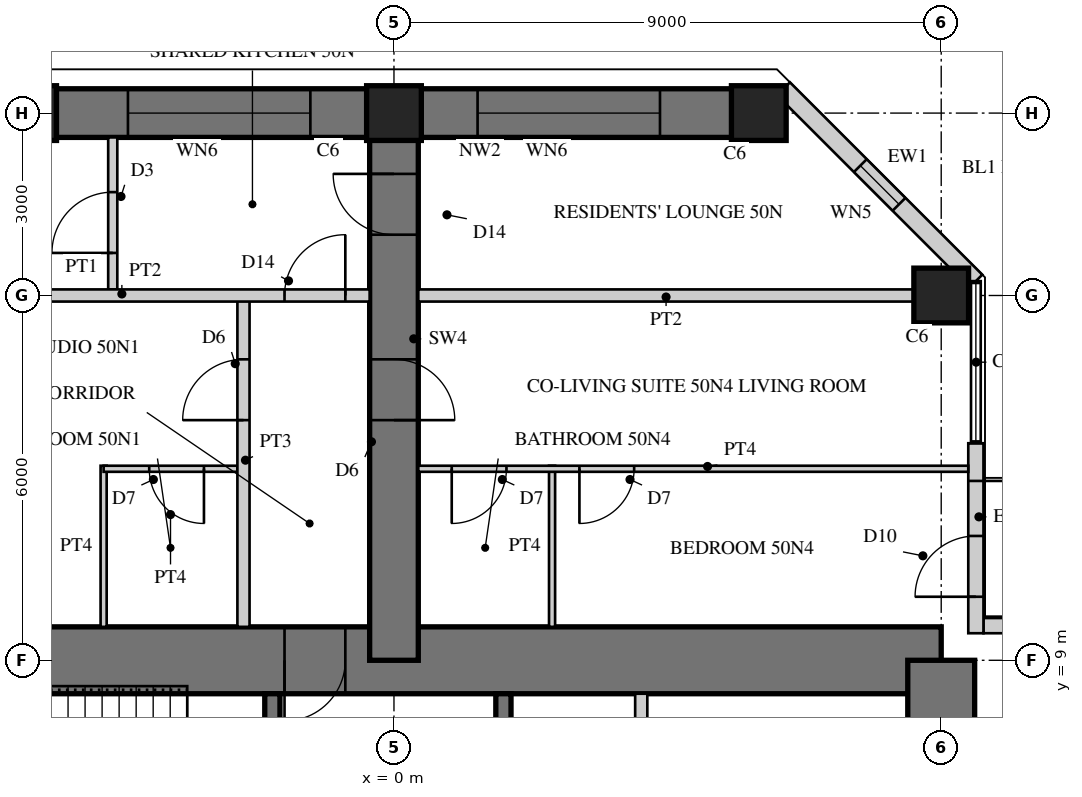
"""IFC4 building model, lengths in metres.
Left out: names, types, materials, properties, quantities, classifications, styles, units other than length and angle.
Written with IfcOpenShell. Run it as: python <this file> out.ifc"""

import sys

from ifc_helpers import new_model, si_unit, direction, frame, frame_2d, origin, origin_2d, place, context, subcontext, project, spatial, rectangle, hollow_rectangle, extrude, element, fill, save


model = new_model("IFC4")
c1 = context("Model", 3, precision=1e-05, world=origin(), true_north=direction((0.0, 1.0)))
c2 = subcontext(c1, "Body", "Model", "MODEL_VIEW")
j1 = project(units=[si_unit("LENGTHUNIT", "METRE"), si_unit("PLANEANGLEUNIT", "RADIAN")], contexts=[c1])
p1 = place(None, origin())
s1 = spatial("IfcSite", under=j1, at=p1, CompositionType="ELEMENT")
p2 = place(p1, origin())
s2 = spatial("IfcBuilding", under=s1, at=p2, CompositionType="ELEMENT")
p3 = place(p2, frame((0.0, 0.0, 200.1)))
s3 = spatial("IfcBuildingStorey", under=s2, at=p3, CompositionType="ELEMENT", Elevation=200.1)
p4 = place(p3, frame((9.0, 9.0, 0.0), z_axis=(0.0, 0.0, 1.0), x_axis=(-1.0, 0.0, 0.0)))
e1 = element("IfcWall", 1, at=p4, inside=s3, PredefinedType="SHEAR", context=c2, shape_type="SweptSolid", body=[
    extrude(rectangle(XDim=18.0, YDim=1.1, at=frame_2d((9.0, 0.0))), origin(), (0.0, 0.0, 1.0), 3.4),
])
p5 = place(p4, frame((9.8, 0.0, 0.0)))
e2 = element("IfcOpeningElement", 2, at=p5, cuts=e1, PredefinedType="OPENING", context=c2, shape_type="SweptSolid", body=[
    extrude(rectangle(XDim=1.0, YDim=2.4, at=frame_2d((0.5, 1.2))), frame((0.0, 0.56, 0.0), z_axis=(0.0, -1.0, 0.0), x_axis=(1.0, 0.0, 0.0)), (0.0, 0.0, 1.0), 1.12),
])
p6 = place(p3, frame((9.0, -9.0, 0.0), z_axis=(0.0, 0.0, 1.0), x_axis=(0.0, 1.0, 0.0)))
e3 = element("IfcWall", 3, at=p6, inside=s3, PredefinedType="SHEAR", context=c2, shape_type="SweptSolid", body=[
    extrude(rectangle(XDim=18.0, YDim=1.1, at=frame_2d((9.0, 0.0))), origin(), (0.0, 0.0, 1.0), 3.4),
])
p7 = place(p6, frame((9.8, 0.0, 0.0)))
e4 = element("IfcOpeningElement", 4, at=p7, cuts=e3, PredefinedType="OPENING", context=c2, shape_type="SweptSolid", body=[
    extrude(rectangle(XDim=1.0, YDim=2.4, at=frame_2d((0.5, 1.2))), frame((0.0, 0.56, 0.0), z_axis=(0.0, -1.0, 0.0), x_axis=(1.0, 0.0, 0.0)), (0.0, 0.0, 1.0), 1.12),
])
p8 = place(p3, frame((1.8, 1.875, 0.0), z_axis=(0.0, 0.0, 1.0), x_axis=(0.0, 1.0, 0.0)))
e5 = element("IfcWall", 5, at=p8, inside=s3, PredefinedType="SHEAR", context=c2, shape_type="SweptSolid", body=[
    extrude(rectangle(XDim=6.575, YDim=0.25, at=frame_2d((3.288, 0.0))), origin(), (0.0, 0.0, 1.0), 3.4),
])
p9 = place(p8, frame((1.875, 0.0, 0.0)))
e6 = element("IfcOpeningElement", 6, at=p9, cuts=e5, PredefinedType="OPENING", context=c2, shape_type="SweptSolid", body=[
    extrude(rectangle(XDim=1.6, YDim=2.4, at=frame_2d((0.8, 1.2))), frame((0.0, 0.135, 0.0), z_axis=(0.0, -1.0, 0.0), x_axis=(1.0, 0.0, 0.0)), (0.0, 0.0, 1.0), 0.27),
])
p10 = place(p3, frame((4.067, 5.975, 0.0), z_axis=(0.0, 0.0, 1.0), x_axis=(0.0, 1.0, 0.0)))
e7 = element("IfcWall", 7, at=p10, inside=s3, PredefinedType="PARTITIONING", context=c2, shape_type="SweptSolid", body=[
    extrude(rectangle(XDim=2.475, YDim=0.2, at=frame_2d((1.237, 0.0))), origin(), (0.0, 0.0, 1.0), 3.4),
])
p11 = place(p3, frame((-2.0, 1.675, 0.0), z_axis=(0.0, 0.0, 1.0), x_axis=(0.0, 1.0, 0.0)))
e8 = element("IfcWall", 8, at=p11, inside=s3, PredefinedType="SHEAR", context=c2, shape_type="SweptSolid", body=[
    extrude(rectangle(XDim=6.775, YDim=0.25, at=frame_2d((3.387, 0.0))), origin(), (0.0, 0.0, 1.0), 3.4),
])
p12 = place(p11, frame((0.725, 0.0, 0.0)))
e9 = element("IfcOpeningElement", 9, at=p12, cuts=e8, PredefinedType="OPENING", context=c2, shape_type="SweptSolid", body=[
    extrude(rectangle(XDim=1.0, YDim=2.1, at=frame_2d((0.5, 1.05))), frame((0.0, 0.135, 0.0), z_axis=(0.0, -1.0, 0.0), x_axis=(1.0, 0.0, 0.0)), (0.0, 0.0, 1.0), 0.27),
])
p13 = place(p3, frame((0.0, 9.0, 0.0), z_axis=(0.0, 0.0, 1.0), x_axis=(0.0, 1.0, 0.0)))
e10 = element("IfcWall", 10, at=p13, inside=s3, PredefinedType="SHEAR", context=c2, shape_type="SweptSolid", body=[
    extrude(rectangle(XDim=9.0, YDim=0.8, at=frame_2d((4.5, 0.0))), origin(), (0.0, 0.0, 1.0), 3.4),
])
p14 = place(p13, frame((3.95, 0.0, 0.0)))
e11 = element("IfcOpeningElement", 11, at=p14, cuts=e10, PredefinedType="OPENING", context=c2, shape_type="SweptSolid", body=[
    extrude(rectangle(XDim=1.0, YDim=2.15, at=frame_2d((0.5, 1.075))), frame((0.0, 0.41, 0.0), z_axis=(0.0, -1.0, 0.0), x_axis=(1.0, 0.0, 0.0)), (0.0, 0.0, 1.0), 0.82),
])
p15 = place(p13, frame((7.0, 0.0, 0.0)))
e12 = element("IfcOpeningElement", 12, at=p15, cuts=e10, PredefinedType="OPENING", context=c2, shape_type="SweptSolid", body=[
    extrude(rectangle(XDim=1.0, YDim=2.2, at=frame_2d((0.5, 1.1))), frame((0.0, 0.41, 0.0), z_axis=(0.0, -1.0, 0.0), x_axis=(1.0, 0.0, 0.0)), (0.0, 0.0, 1.0), 0.82),
])
p16 = place(p3, frame((6.0, 18.0, 0.0), z_axis=(0.0, 0.0, 1.0), x_axis=(-1.0, 0.0, 0.0)))
e13 = element("IfcWall", 13, at=p16, inside=s3, PredefinedType="SHEAR", context=c2, shape_type="SweptSolid", body=[
    extrude(rectangle(XDim=12.0, YDim=0.8, at=frame_2d((6.0, 0.0))), origin(), (0.0, 0.0, 1.0), 3.4),
])
p17 = place(p16, frame((1.625, 0.0, 0.6)))
e14 = element("IfcOpeningElement", 14, at=p17, cuts=e13, PredefinedType="OPENING", context=c2, shape_type="SweptSolid", body=[
    extrude(rectangle(XDim=3.0, YDim=2.4, at=frame_2d((1.5, 1.2))), frame((0.0, 0.41, 0.0), z_axis=(0.0, -1.0, 0.0), x_axis=(1.0, 0.0, 0.0)), (0.0, 0.0, 1.0), 0.82),
])
p18 = place(p16, frame((7.375, 0.0, 0.6)))
e15 = element("IfcOpeningElement", 15, at=p18, cuts=e13, PredefinedType="OPENING", context=c2, shape_type="SweptSolid", body=[
    extrude(rectangle(XDim=3.0, YDim=2.4, at=frame_2d((1.5, 1.2))), frame((0.0, 0.41, 0.0), z_axis=(0.0, -1.0, 0.0), x_axis=(1.0, 0.0, 0.0)), (0.0, 0.0, 1.0), 0.82),
])
for number, where, z_axis, x_axis in (
    (16, (9.0, 15.0, 0.0), (0.0, 0.0, 1.0), (1.0, 0.0, 0.0)),
    (17, (6.0, 18.0, 0.0), (0.0, 0.0, 1.0), (1.0, 0.0, 0.0)),
    (18, (0.0, 18.0, 0.0), (0.0, 0.0, 1.0), (1.0, 0.0, 0.0)),
    (19, (-6.0, 18.0, 0.0), (0.0, 0.0, 1.0), (1.0, 0.0, 0.0)),
):
    element("IfcColumn", number, at=place(p3, frame(where, z_axis=z_axis, x_axis=x_axis)), inside=s3, PredefinedType="COLUMN", context=c2, shape_type="SweptSolid", body=[
        extrude(rectangle(XDim=0.9, YDim=0.9, at=origin_2d()), origin(), (0.0, 0.0, 1.0), 3.4),
    ])
p19 = place(p3, frame((12.57, 9.57, 0.0), z_axis=(0.0, 0.0, 1.0), x_axis=(-1.0, 0.0, 0.0)))
e20 = element("IfcWall", 20, at=p19, inside=s3, PredefinedType="SOLIDWALL", context=c2, shape_type="SweptSolid", body=[
    extrude(rectangle(XDim=2.875, YDim=0.25, at=frame_2d((1.438, 0.0))), origin(), (0.0, 0.0, 1.0), 3.22),
])
p20 = place(p19, frame((0.6, 0.0, 0.0)))
e21 = element("IfcOpeningElement", 21, at=p20, cuts=e20, PredefinedType="OPENING", context=c2, shape_type="SweptSolid", body=[
    extrude(rectangle(XDim=1.0, YDim=2.2, at=frame_2d((0.5, 1.1))), frame((0.0, 0.135, 0.0), z_axis=(0.0, -1.0, 0.0), x_axis=(1.0, 0.0, 0.0)), (0.0, 0.0, 1.0), 0.27),
])
p21 = place(p3, frame((9.57, 9.445, 0.0), z_axis=(0.0, 0.0, 1.0), x_axis=(0.0, 1.0, 0.0)))
e22 = element("IfcWall", 22, at=p21, inside=s3, PredefinedType="SOLIDWALL", context=c2, shape_type="SweptSolid", body=[
    extrude(rectangle(XDim=3.125, YDim=0.25, at=frame_2d((1.562, 0.0))), origin(), (0.0, 0.0, 1.0), 3.22),
])
p22 = place(p21, frame((0.6, 0.0, 0.0)))
e23 = element("IfcOpeningElement", 23, at=p22, cuts=e22, PredefinedType="OPENING", context=c2, shape_type="SweptSolid", body=[
    extrude(rectangle(XDim=1.0, YDim=2.2, at=frame_2d((0.5, 1.1))), frame((0.0, 0.135, 0.0), z_axis=(0.0, -1.0, 0.0), x_axis=(1.0, 0.0, 0.0)), (0.0, 0.0, 1.0), 0.27),
])
p23 = place(p3, frame((9.57, 15.236, 0.0), z_axis=(0.0, 0.0, 1.0), x_axis=(-0.707134062067, 0.707079499254, 0.0)))
e24 = element("IfcWall", 24, at=p23, inside=s3, PredefinedType="SOLIDWALL", context=c2, shape_type="SweptSolid", body=[
    extrude(rectangle(XDim=4.475, YDim=0.3, at=frame_2d((2.237, 0.0))), origin(), (0.0, 0.0, 1.0), 3.22),
])
p24 = place(p23, frame((1.787, 0.0, 0.3)))
e25 = element("IfcOpeningElement", 25, at=p24, cuts=e24, PredefinedType="OPENING", context=c2, shape_type="SweptSolid", body=[
    extrude(rectangle(XDim=0.9, YDim=2.4, at=frame_2d((0.45, 1.2))), frame((0.0, 0.16, 0.0), z_axis=(0.0, -1.0, 0.0), x_axis=(1.0, 0.0, 0.0)), (0.0, 0.0, 1.0), 0.32),
])
p25 = place(p3, frame((-4.775, 9.55, 0.0), z_axis=(0.0, 0.0, 1.0), x_axis=(0.0, 1.0, 0.0)))
e26 = element("IfcWall", 26, at=p25, inside=s3, PredefinedType="PARTITIONING", context=c2, shape_type="SweptSolid", body=[
    extrude(rectangle(XDim=2.65, YDim=0.1, at=frame_2d((1.325, 0.0))), origin(), (0.0, 0.0, 1.0), 3.22),
])
p26 = place(p3, frame((-2.575, 12.15, 0.0), z_axis=(0.0, 0.0, 1.0), x_axis=(-1.0, 0.0, 0.0)))
e27 = element("IfcWall", 27, at=p26, inside=s3, PredefinedType="PARTITIONING", context=c2, shape_type="SweptSolid", body=[
    extrude(rectangle(XDim=2.2, YDim=0.1, at=frame_2d((1.1, 0.0))), origin(), (0.0, 0.0, 1.0), 3.22),
])
p27 = place(p26, frame((0.55, 0.0, 0.0)))
e28 = element("IfcOpeningElement", 28, at=p27, cuts=e27, PredefinedType="OPENING", context=c2, shape_type="SweptSolid", body=[
    extrude(rectangle(XDim=0.9, YDim=2.1, at=frame_2d((0.45, 1.05))), frame((0.0, 0.06, 0.0), z_axis=(0.0, -1.0, 0.0), x_axis=(1.0, 0.0, 0.0)), (0.0, 0.0, 1.0), 0.12),
])
p28 = place(p3, frame((2.6, 9.55, 0.0), z_axis=(0.0, 0.0, 1.0), x_axis=(0.0, 1.0, 0.0)))
e29 = element("IfcWall", 29, at=p28, inside=s3, PredefinedType="PARTITIONING", context=c2, shape_type="SweptSolid", body=[
    extrude(rectangle(XDim=2.65, YDim=0.1, at=frame_2d((1.325, 0.0))), origin(), (0.0, 0.0, 1.0), 3.22),
])
p29 = place(p3, frame((9.445, 12.15, 0.0), z_axis=(0.0, 0.0, 1.0), x_axis=(-1.0, 0.0, 0.0)))
e30 = element("IfcWall", 30, at=p29, inside=s3, PredefinedType="PARTITIONING", context=c2, shape_type="SweptSolid", body=[
    extrude(rectangle(XDim=9.045, YDim=0.1, at=frame_2d((4.522, 0.0))), origin(), (0.0, 0.0, 1.0), 3.22),
])
p30 = place(p29, frame((5.495, 0.0, 0.0)))
e31 = element("IfcOpeningElement", 31, at=p30, cuts=e30, PredefinedType="OPENING", context=c2, shape_type="SweptSolid", body=[
    extrude(rectangle(XDim=0.9, YDim=2.1, at=frame_2d((0.45, 1.05))), frame((0.0, 0.06, 0.0), z_axis=(0.0, -1.0, 0.0), x_axis=(1.0, 0.0, 0.0)), (0.0, 0.0, 1.0), 0.12),
])
p31 = place(p29, frame((7.595, 0.0, 0.0)))
e32 = element("IfcOpeningElement", 32, at=p31, cuts=e30, PredefinedType="OPENING", context=c2, shape_type="SweptSolid", body=[
    extrude(rectangle(XDim=0.9, YDim=2.1, at=frame_2d((0.45, 1.05))), frame((0.0, 0.06, 0.0), z_axis=(0.0, -1.0, 0.0), x_axis=(1.0, 0.0, 0.0)), (0.0, 0.0, 1.0), 0.12),
])
p32 = place(p3, frame((-2.475, 9.55, 0.0), z_axis=(0.0, 0.0, 1.0), x_axis=(0.0, 1.0, 0.0)))
e33 = element("IfcWall", 33, at=p32, inside=s3, PredefinedType="SOLIDWALL", context=c2, shape_type="SweptSolid", body=[
    extrude(rectangle(XDim=5.45, YDim=0.2, at=frame_2d((2.725, 0.0))), origin(), (0.0, 0.0, 1.0), 3.22),
])
p33 = place(p32, frame((3.4, 0.0, 0.0)))
e34 = element("IfcOpeningElement", 34, at=p33, cuts=e33, PredefinedType="OPENING", context=c2, shape_type="SweptSolid", body=[
    extrude(rectangle(XDim=1.0, YDim=2.15, at=frame_2d((0.5, 1.075))), frame((0.0, 0.11, 0.0), z_axis=(0.0, -1.0, 0.0), x_axis=(1.0, 0.0, 0.0)), (0.0, 0.0, 1.0), 0.22),
])
p34 = place(p3, frame((-4.625, 15.1, 0.0), z_axis=(0.0, 0.0, 1.0), x_axis=(0.0, 1.0, 0.0)))
e35 = element("IfcWall", 35, at=p34, inside=s3, PredefinedType="PARTITIONING", context=c2, shape_type="SweptSolid", body=[
    extrude(rectangle(XDim=2.5, YDim=0.15, at=frame_2d((1.25, 0.0))), origin(), (0.0, 0.0, 1.0), 3.22),
])
p35 = place(p34, frame((0.6, 0.0, 0.0)))
e36 = element("IfcOpeningElement", 36, at=p35, cuts=e35, PredefinedType="OPENING", context=c2, shape_type="SweptSolid", body=[
    extrude(rectangle(XDim=1.0, YDim=2.1, at=frame_2d((0.5, 1.05))), frame((0.0, 0.085, 0.0), z_axis=(0.0, -1.0, 0.0), x_axis=(1.0, 0.0, 0.0)), (0.0, 0.0, 1.0), 0.17),
])
p36 = place(p3, frame((8.55, 15.0, 0.0), z_axis=(0.0, 0.0, 1.0), x_axis=(-1.0, 0.0, 0.0)))
e37 = element("IfcWall", 37, at=p36, inside=s3, PredefinedType="SOLIDWALL", context=c2, shape_type="SweptSolid", body=[
    extrude(rectangle(XDim=8.15, YDim=0.2, at=frame_2d((4.075, 0.0))), origin(), (0.0, 0.0, 1.0), 2.47),
])
p37 = place(p3, frame((-0.4, 15.0, 0.0), z_axis=(0.0, 0.0, 1.0), x_axis=(-1.0, 0.0, 0.0)))
e38 = element("IfcWall", 38, at=p37, inside=s3, PredefinedType="SOLIDWALL", context=c2, shape_type="SweptSolid", body=[
    extrude(rectangle(XDim=8.15, YDim=0.2, at=frame_2d((4.075, 0.0))), origin(), (0.0, 0.0, 1.0), 2.47),
])
p38 = place(p37, frame((0.4, 0.0, 0.0)))
e39 = element("IfcOpeningElement", 39, at=p38, cuts=e38, PredefinedType="OPENING", context=c2, shape_type="SweptSolid", body=[
    extrude(rectangle(XDim=1.0, YDim=2.2, at=frame_2d((0.5, 1.1))), frame((0.0, 0.11, 0.0), z_axis=(0.0, -1.0, 0.0), x_axis=(1.0, 0.0, 0.0)), (0.0, 0.0, 1.0), 0.22),
])
p39 = place(p22, origin())
e40 = element("IfcDoor", 40, at=p39, inside=s3, OperationType="SINGLE_SWING_LEFT", PredefinedType="DOOR", context=c2, shape_type="SweptSolid", body=[
    extrude(hollow_rectangle(XDim=1.0, YDim=2.2, WallThickness=0.06, at=frame_2d((0.5, 1.1))), frame((0.0, 0.025, 0.0), z_axis=(0.0, -1.0, 0.0), x_axis=(1.0, 0.0, 0.0)), (0.0, 0.0, 1.0), 0.05),
    extrude(rectangle(XDim=0.879, YDim=2.079, at=frame_2d((0.5, 1.1))), frame((0.0, 0.025, 0.0), z_axis=(0.0, -1.0, 0.0), x_axis=(1.0, 0.0, 0.0)), (0.0, 0.0, 1.0), 0.05),
])
fill(e23, e40)
p40 = place(p24, origin())
e41 = element("IfcWindow", 41, at=p40, inside=s3, PartitioningType="SINGLE_PANEL", PredefinedType="WINDOW", context=c2, shape_type="SweptSolid", body=[
    extrude(hollow_rectangle(XDim=0.9, YDim=2.4, WallThickness=0.06, at=frame_2d((0.45, 1.2))), frame((0.0, 0.03, 0.0), z_axis=(0.0, -1.0, 0.0), x_axis=(1.0, 0.0, 0.0)), (0.0, 0.0, 1.0), 0.06),
    extrude(rectangle(XDim=0.779, YDim=2.279, at=frame_2d((0.45, 1.2))), frame((0.0, 0.03, 0.0), z_axis=(0.0, -1.0, 0.0), x_axis=(1.0, 0.0, 0.0)), (0.0, 0.0, 1.0), 0.06),
])
fill(e25, e41)
p41 = place(p17, origin())
e42 = element("IfcWindow", 42, at=p41, inside=s3, PartitioningType="SINGLE_PANEL", PredefinedType="WINDOW", context=c2, shape_type="SweptSolid", body=[
    extrude(hollow_rectangle(XDim=3.0, YDim=2.4, WallThickness=0.06, at=frame_2d((1.5, 1.2))), frame((0.0, 0.03, 0.0), z_axis=(0.0, -1.0, 0.0), x_axis=(1.0, 0.0, 0.0)), (0.0, 0.0, 1.0), 0.06),
    extrude(rectangle(XDim=2.879, YDim=2.279, at=frame_2d((1.5, 1.2))), frame((0.0, 0.03, 0.0), z_axis=(0.0, -1.0, 0.0), x_axis=(1.0, 0.0, 0.0)), (0.0, 0.0, 1.0), 0.06),
])
fill(e14, e42)
p42 = place(p18, origin())
e43 = element("IfcWindow", 43, at=p42, inside=s3, PartitioningType="SINGLE_PANEL", PredefinedType="WINDOW", context=c2, shape_type="SweptSolid", body=[
    extrude(hollow_rectangle(XDim=3.0, YDim=2.4, WallThickness=0.06, at=frame_2d((1.5, 1.2))), frame((0.0, 0.03, 0.0), z_axis=(0.0, -1.0, 0.0), x_axis=(1.0, 0.0, 0.0)), (0.0, 0.0, 1.0), 0.06),
    extrude(rectangle(XDim=2.879, YDim=2.279, at=frame_2d((1.5, 1.2))), frame((0.0, 0.03, 0.0), z_axis=(0.0, -1.0, 0.0), x_axis=(1.0, 0.0, 0.0)), (0.0, 0.0, 1.0), 0.06),
])
fill(e15, e43)
p43 = place(p27, origin())
e44 = element("IfcDoor", 44, at=p43, inside=s3, OperationType="SINGLE_SWING_LEFT", PredefinedType="DOOR", context=c2, shape_type="SweptSolid", body=[
    extrude(rectangle(XDim=0.9, YDim=2.1, at=frame_2d((0.45, 1.05))), frame((0.0, 0.025, 0.0), z_axis=(0.0, -1.0, 0.0), x_axis=(1.0, 0.0, 0.0)), (0.0, 0.0, 1.0), 0.05),
])
fill(e28, e44)
p44 = place(p30, origin())
e45 = element("IfcDoor", 45, at=p44, inside=s3, OperationType="SINGLE_SWING_RIGHT", PredefinedType="DOOR", context=c2, shape_type="SweptSolid", body=[
    extrude(rectangle(XDim=0.9, YDim=2.1, at=frame_2d((0.45, 1.05))), frame((0.0, 0.025, 0.0), z_axis=(0.0, -1.0, 0.0), x_axis=(1.0, 0.0, 0.0)), (0.0, 0.0, 1.0), 0.05),
])
fill(e31, e45)
p45 = place(p31, origin())
e46 = element("IfcDoor", 46, at=p45, inside=s3, OperationType="SINGLE_SWING_RIGHT", PredefinedType="DOOR", context=c2, shape_type="SweptSolid", body=[
    extrude(rectangle(XDim=0.9, YDim=2.1, at=frame_2d((0.45, 1.05))), frame((0.0, 0.025, 0.0), z_axis=(0.0, -1.0, 0.0), x_axis=(1.0, 0.0, 0.0)), (0.0, 0.0, 1.0), 0.05),
])
fill(e32, e46)
p46 = place(p33, origin())
e47 = element("IfcDoor", 47, at=p46, inside=s3, OperationType="SINGLE_SWING_LEFT", PredefinedType="DOOR", context=c2, shape_type="SweptSolid", body=[
    extrude(rectangle(XDim=1.0, YDim=2.15, at=frame_2d((0.5, 1.075))), frame((0.0, 0.025, 0.0), z_axis=(0.0, -1.0, 0.0), x_axis=(1.0, 0.0, 0.0)), (0.0, 0.0, 1.0), 0.05),
])
fill(e34, e47)
p47 = place(p35, origin())
e48 = element("IfcDoor", 48, at=p47, inside=s3, OperationType="SINGLE_SWING_LEFT", PredefinedType="DOOR", context=c2, shape_type="SweptSolid", body=[
    extrude(rectangle(XDim=1.0, YDim=2.1, at=frame_2d((0.5, 1.05))), frame((0.0, 0.025, 0.0), z_axis=(0.0, -1.0, 0.0), x_axis=(1.0, 0.0, 0.0)), (0.0, 0.0, 1.0), 0.05),
])
fill(e36, e48)
p48 = place(p38, frame((1.0, 0.0, 0.0), z_axis=(0.0, 0.0, 1.0), x_axis=(-1.0, 0.0, 0.0)))
e49 = element("IfcDoor", 49, at=p48, inside=s3, OperationType="SINGLE_SWING_RIGHT", PredefinedType="DOOR", context=c2, shape_type="SweptSolid", body=[
    extrude(rectangle(XDim=1.0, YDim=2.2, at=frame_2d((0.5, 1.1))), frame((0.0, 0.025, 0.0), z_axis=(0.0, -1.0, 0.0), x_axis=(1.0, 0.0, 0.0)), (0.0, 0.0, 1.0), 0.05),
])
fill(e39, e49)
p49 = place(p14, frame((1.0, 0.0, 0.0), z_axis=(0.0, 0.0, 1.0), x_axis=(-1.0, 0.0, 0.0)))
e50 = element("IfcDoor", 50, at=p49, inside=s3, OperationType="SINGLE_SWING_RIGHT", PredefinedType="DOOR", context=c2, shape_type="SweptSolid", body=[
    extrude(rectangle(XDim=1.0, YDim=2.15, at=frame_2d((0.5, 1.075))), frame((0.0, 0.025, 0.0), z_axis=(0.0, -1.0, 0.0), x_axis=(1.0, 0.0, 0.0)), (0.0, 0.0, 1.0), 0.05),
])
fill(e11, e50)
p50 = place(p15, origin())
e51 = element("IfcDoor", 51, at=p50, inside=s3, OperationType="SINGLE_SWING_RIGHT", PredefinedType="DOOR", context=c2, shape_type="SweptSolid", body=[
    extrude(rectangle(XDim=1.0, YDim=2.2, at=frame_2d((0.5, 1.1))), frame((0.0, 0.025, 0.0), z_axis=(0.0, -1.0, 0.0), x_axis=(1.0, 0.0, 0.0)), (0.0, 0.0, 1.0), 0.05),
])
fill(e12, e51)
p51 = place(p5, origin())
e52 = element("IfcDoor", 52, at=p51, inside=s3, OperationType="SINGLE_SWING_RIGHT", PredefinedType="DOOR", context=c2, shape_type="SweptSolid", body=[
    extrude(rectangle(XDim=1.0, YDim=2.4, at=frame_2d((0.5, 1.2))), frame((0.0, 0.055, 0.0), z_axis=(0.0, -1.0, 0.0), x_axis=(1.0, 0.0, 0.0)), (0.0, 0.0, 1.0), 0.05),
])
fill(e2, e52)
save(model, sys.argv[1])
